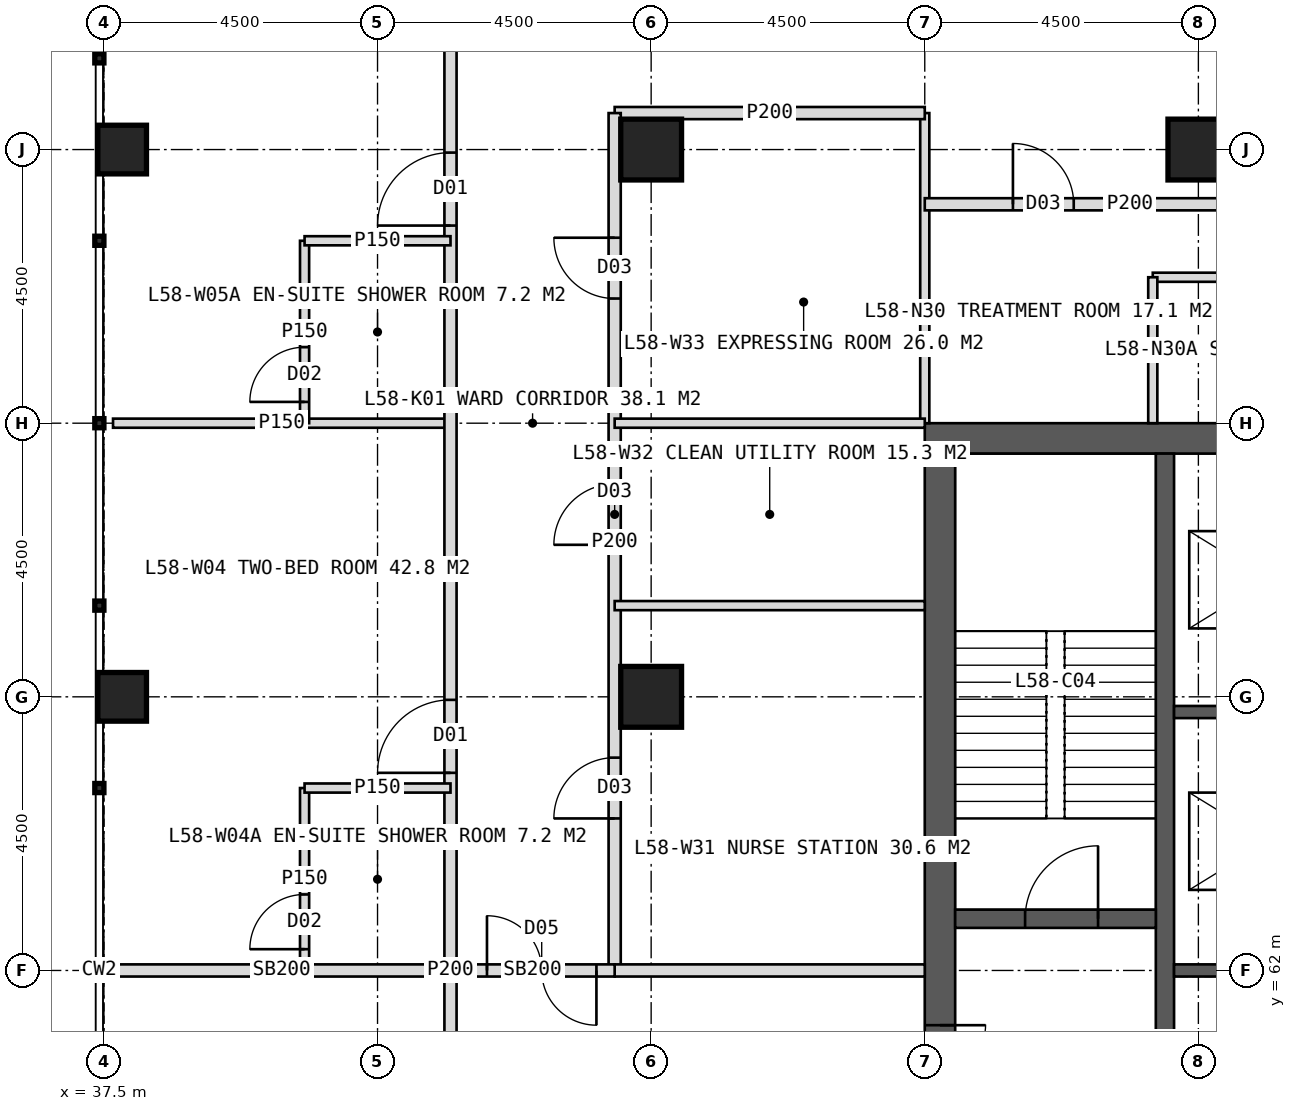
"""IFC4 building model, lengths in metres.
Left out: names, types, materials, properties, quantities, classifications, styles, units other than length and angle.
Written with IfcOpenShell. Run it as: python <this file> out.ifc"""

import sys

from ifc_helpers import new_model, si_unit, direction, frame, frame_2d, origin, origin_2d, place, context, subcontext, project, spatial, rectangle, hollow_rectangle, extrude, element, fill, save


model = new_model("IFC4")
c1 = context("Model", 3, precision=1e-05, world=origin(), true_north=direction((0.0, 1.0)))
c2 = subcontext(c1, "Body", "Model", "MODEL_VIEW")
j1 = project(units=[si_unit("LENGTHUNIT", "METRE"), si_unit("PLANEANGLEUNIT", "RADIAN")], contexts=[c1])
p1 = place(None, origin())
s1 = spatial("IfcSite", under=j1, at=p1, CompositionType="ELEMENT")
p2 = place(p1, origin())
s2 = spatial("IfcBuilding", under=s1, at=p2, CompositionType="ELEMENT")
p3 = place(p2, frame((0.0, 0.0, 241.0)))
s3 = spatial("IfcBuildingStorey", under=s2, at=p3, CompositionType="ELEMENT", Elevation=241.0)
p4 = place(p3, frame((51.0, 70.75, 0.0), z_axis=(0.0, 0.0, 1.0), x_axis=(1.0, 0.0, 0.0)))
e1 = element("IfcWall", 1, at=p4, inside=s3, PredefinedType="SHEAR", context=c2, shape_type="SweptSolid", body=[
    extrude(rectangle(XDim=18.0, YDim=0.5, at=frame_2d((9.0, 0.0))), origin(), (0.0, 0.0, 1.0), 4.0),
])
p5 = place(p4, frame((8.1, 0.0, 0.0)))
e2 = element("IfcOpeningElement", 2, at=p5, cuts=e1, PredefinedType="OPENING", context=c2, shape_type="SweptSolid", body=[
    extrude(rectangle(XDim=1.8, YDim=2.2, at=frame_2d((0.9, 1.1))), frame((0.0, 0.26, 0.0), z_axis=(0.0, -1.0, 0.0), x_axis=(1.0, 0.0, 0.0)), (0.0, 0.0, 1.0), 0.52),
])
p6 = place(p3, frame((51.25, 53.5, 0.0), z_axis=(0.0, 0.0, 1.0), x_axis=(0.0, 1.0, 0.0)))
e3 = element("IfcWall", 3, at=p6, inside=s3, PredefinedType="SHEAR", context=c2, shape_type="SweptSolid", body=[
    extrude(rectangle(XDim=17.0, YDim=0.5, at=frame_2d((8.5, 0.0))), origin(), (0.0, 0.0, 1.0), 4.0),
])
p7 = place(p6, frame((6.1, 0.0, 0.0)))
e4 = element("IfcOpeningElement", 4, at=p7, cuts=e3, PredefinedType="OPENING", context=c2, shape_type="SweptSolid", body=[
    extrude(rectangle(XDim=1.5, YDim=2.2, at=frame_2d((0.75, 1.1))), frame((0.0, 0.26, 0.0), z_axis=(0.0, -1.0, 0.0), x_axis=(1.0, 0.0, 0.0)), (0.0, 0.0, 1.0), 0.52),
])
p8 = place(p3, frame((54.95, 53.5, 0.0), z_axis=(0.0, 0.0, 1.0), x_axis=(0.0, 1.0, 0.0)))
e5 = element("IfcWall", 5, at=p8, inside=s3, PredefinedType="SHEAR", context=c2, shape_type="SweptSolid", body=[
    extrude(rectangle(XDim=17.0, YDim=0.3, at=frame_2d((8.5, 0.0))), origin(), (0.0, 0.0, 1.0), 4.0),
])
for number, where, z_axis, x_axis in (
    (6, (55.1, 62.0, 0.0), (0.0, 0.0, 1.0), (1.0, 0.0, 0.0)),
    (7, (55.1, 66.25, 0.0), (0.0, 0.0, 1.0), (1.0, 0.0, 0.0)),
):
    element("IfcWall", number, at=place(p3, frame(where, z_axis=z_axis, x_axis=x_axis)), inside=s3, PredefinedType="SHEAR", context=c2, shape_type="SweptSolid", body=[
        extrude(rectangle(XDim=3.05, YDim=0.2, at=frame_2d((1.525, 0.0))), origin(), (0.0, 0.0, 1.0), 4.0),
    ])
p9 = place(p3, frame((51.5, 62.85, 0.0), z_axis=(0.0, 0.0, 1.0), x_axis=(1.0, 0.0, 0.0)))
e8 = element("IfcWall", 8, at=p9, inside=s3, PredefinedType="SHEAR", context=c2, shape_type="SweptSolid", body=[
    extrude(rectangle(XDim=3.3, YDim=0.3, at=frame_2d((1.65, 0.0))), origin(), (0.0, 0.0, 1.0), 4.0),
])
p10 = place(p9, frame((1.15, 0.0, 0.0)))
e9 = element("IfcOpeningElement", 9, at=p10, cuts=e8, PredefinedType="OPENING", context=c2, shape_type="SweptSolid", body=[
    extrude(rectangle(XDim=1.2, YDim=2.1, at=frame_2d((0.6, 1.05))), frame((0.0, 0.16, 0.0), z_axis=(0.0, -1.0, 0.0), x_axis=(1.0, 0.0, 0.0)), (0.0, 0.0, 1.0), 0.32),
])
for number, where, z_axis, x_axis in (
    (10, (46.5, 75.5, 0.0), (0.0, 0.0, 1.0), (1.0, 0.0, 0.0)),
    (11, (55.5, 75.5, 0.0), (0.0, 0.0, 1.0), (1.0, 0.0, 0.0)),
    (12, (46.5, 66.5, 0.0), (0.0, 0.0, 1.0), (1.0, 0.0, 0.0)),
):
    element("IfcColumn", number, at=place(p3, frame(where, z_axis=z_axis, x_axis=x_axis)), inside=s3, PredefinedType="COLUMN", context=c2, shape_type="SweptSolid", body=[
        extrude(hollow_rectangle(XDim=1.0, YDim=1.0, WallThickness=0.1, at=origin_2d()), origin(), (0.0, 0.0, 1.0), 4.0),
    ])
for number, where, z_axis, x_axis in (
    (13, (37.8, 66.5, 0.0), (0.0, 0.0, 1.0), (1.0, 0.0, 0.0)),
    (14, (37.8, 75.5, 0.0), (0.0, 0.0, 1.0), (1.0, 0.0, 0.0)),
):
    element("IfcColumn", number, at=place(p3, frame(where, z_axis=z_axis, x_axis=x_axis)), inside=s3, PredefinedType="COLUMN", context=c2, shape_type="SweptSolid", body=[
        extrude(hollow_rectangle(XDim=0.8, YDim=0.8, WallThickness=0.08, at=origin_2d()), origin(), (0.0, 0.0, 1.0), 4.0),
    ])
p11 = place(p3, frame((51.0, 71.0, 0.0), z_axis=(0.0, 0.0, 1.0), x_axis=(0.0, 1.0, 0.0)))
e15 = element("IfcWall", 15, at=p11, inside=s3, PredefinedType="PARTITIONING", context=c2, shape_type="SweptSolid", body=[
    extrude(rectangle(XDim=5.1, YDim=0.15, at=frame_2d((2.55, 0.0))), origin(), (0.0, 0.0, 1.0), 3.75),
])
p12 = place(p3, frame((45.9, 76.1, 0.0), z_axis=(0.0, 0.0, 1.0), x_axis=(1.0, 0.0, 0.0)))
e16 = element("IfcWall", 16, at=p12, inside=s3, PredefinedType="PARTITIONING", context=c2, shape_type="SweptSolid", body=[
    extrude(rectangle(XDim=5.1, YDim=0.2, at=frame_2d((2.55, 0.0))), origin(), (0.0, 0.0, 1.0), 3.75),
])
p13 = place(p3, frame((51.0, 74.6, 0.0), z_axis=(0.0, 0.0, 1.0), x_axis=(1.0, 0.0, 0.0)))
e17 = element("IfcWall", 17, at=p13, inside=s3, PredefinedType="PARTITIONING", context=c2, shape_type="SweptSolid", body=[
    extrude(rectangle(XDim=6.75, YDim=0.2, at=frame_2d((3.375, 0.0))), origin(), (0.0, 0.0, 1.0), 3.75),
])
p14 = place(p13, frame((1.45, 0.0, 0.0)))
e18 = element("IfcOpeningElement", 18, at=p14, cuts=e17, PredefinedType="OPENING", context=c2, shape_type="SweptSolid", body=[
    extrude(rectangle(XDim=1.0, YDim=2.1, at=frame_2d((0.5, 1.05))), frame((0.0, 0.11, 0.0), z_axis=(0.0, -1.0, 0.0), x_axis=(1.0, 0.0, 0.0)), (0.0, 0.0, 1.0), 0.22),
])
p15 = place(p3, frame((54.75, 73.4, 0.0), z_axis=(0.0, 0.0, 1.0), x_axis=(1.0, 0.0, 0.0)))
e19 = element("IfcWall", 19, at=p15, inside=s3, PredefinedType="PARTITIONING", context=c2, shape_type="SweptSolid", body=[
    extrude(rectangle(XDim=3.0, YDim=0.15, at=frame_2d((1.5, 0.0))), origin(), (0.0, 0.0, 1.0), 3.75),
])
p16 = place(p3, frame((54.75, 71.0, 0.0), z_axis=(0.0, 0.0, 1.0), x_axis=(0.0, 1.0, 0.0)))
e20 = element("IfcWall", 20, at=p16, inside=s3, PredefinedType="PARTITIONING", context=c2, shape_type="SweptSolid", body=[
    extrude(rectangle(XDim=2.4, YDim=0.15, at=frame_2d((1.2, 0.0))), origin(), (0.0, 0.0, 1.0), 3.75),
])
p17 = place(p3, frame((43.2, 62.0, 0.0), z_axis=(0.0, 0.0, 1.0), x_axis=(-1.0, 0.0, 0.0)))
e21 = element("IfcWall", 21, at=p17, inside=s3, PredefinedType="SOLIDWALL", context=c2, shape_type="SweptSolid", body=[
    extrude(rectangle(XDim=5.55, YDim=0.2, at=frame_2d((2.775, 0.0))), origin(), (0.0, 0.0, 1.0), 2.95),
])
p18 = place(p3, frame((43.2, 71.0, 0.0), z_axis=(0.0, 0.0, 1.0), x_axis=(-1.0, 0.0, 0.0)))
e22 = element("IfcWall", 22, at=p18, inside=s3, PredefinedType="PARTITIONING", context=c2, shape_type="SweptSolid", body=[
    extrude(rectangle(XDim=5.55, YDim=0.15, at=frame_2d((2.775, 0.0))), origin(), (0.0, 0.0, 1.0), 3.75),
])
p19 = place(p3, frame((43.2, 45.2, 0.0), z_axis=(0.0, 0.0, 1.0), x_axis=(0.0, 1.0, 0.0)))
e23 = element("IfcWall", 23, at=p19, inside=s3, PredefinedType="PARTITIONING", context=c2, shape_type="SweptSolid", body=[
    extrude(rectangle(XDim=33.6, YDim=0.2, at=frame_2d((16.8, 0.0))), origin(), (0.0, 0.0, 1.0), 3.75),
])
p20 = place(p19, frame((2.65, 0.0, 0.0)))
e24 = element("IfcOpeningElement", 24, at=p20, cuts=e23, PredefinedType="OPENING", context=c2, shape_type="SweptSolid", body=[
    extrude(rectangle(XDim=1.2, YDim=2.2, at=frame_2d((0.6, 1.1))), frame((0.0, 0.11, 0.0), z_axis=(0.0, -1.0, 0.0), x_axis=(1.0, 0.0, 0.0)), (0.0, 0.0, 1.0), 0.22),
])
p21 = place(p19, frame((7.45, 0.0, 0.0)))
e25 = element("IfcOpeningElement", 25, at=p21, cuts=e23, PredefinedType="OPENING", context=c2, shape_type="SweptSolid", body=[
    extrude(rectangle(XDim=1.2, YDim=2.2, at=frame_2d((0.6, 1.1))), frame((0.0, 0.11, 0.0), z_axis=(0.0, -1.0, 0.0), x_axis=(1.0, 0.0, 0.0)), (0.0, 0.0, 1.0), 0.22),
])
p22 = place(p19, frame((13.45, 0.0, 0.0)))
e26 = element("IfcOpeningElement", 26, at=p22, cuts=e23, PredefinedType="OPENING", context=c2, shape_type="SweptSolid", body=[
    extrude(rectangle(XDim=1.2, YDim=2.2, at=frame_2d((0.6, 1.1))), frame((0.0, 0.11, 0.0), z_axis=(0.0, -1.0, 0.0), x_axis=(1.0, 0.0, 0.0)), (0.0, 0.0, 1.0), 0.22),
])
p23 = place(p19, frame((20.05, 0.0, 0.0)))
e27 = element("IfcOpeningElement", 27, at=p23, cuts=e23, PredefinedType="OPENING", context=c2, shape_type="SweptSolid", body=[
    extrude(rectangle(XDim=1.2, YDim=2.2, at=frame_2d((0.6, 1.1))), frame((0.0, 0.11, 0.0), z_axis=(0.0, -1.0, 0.0), x_axis=(1.0, 0.0, 0.0)), (0.0, 0.0, 1.0), 0.22),
])
p24 = place(p19, frame((29.05, 0.0, 0.0)))
e28 = element("IfcOpeningElement", 28, at=p24, cuts=e23, PredefinedType="OPENING", context=c2, shape_type="SweptSolid", body=[
    extrude(rectangle(XDim=1.2, YDim=2.2, at=frame_2d((0.6, 1.1))), frame((0.0, 0.11, 0.0), z_axis=(0.0, -1.0, 0.0), x_axis=(1.0, 0.0, 0.0)), (0.0, 0.0, 1.0), 0.22),
])
p25 = place(p3, frame((40.8, 62.0, 0.0), z_axis=(0.0, 0.0, 1.0), x_axis=(0.0, 1.0, 0.0)))
e29 = element("IfcWall", 29, at=p25, inside=s3, PredefinedType="PARTITIONING", context=c2, shape_type="SweptSolid", body=[
    extrude(rectangle(XDim=3.0, YDim=0.15, at=frame_2d((1.5, 0.0))), origin(), (0.0, 0.0, 1.0), 3.75),
])
p26 = place(p25, frame((0.35, 0.0, 0.0)))
e30 = element("IfcOpeningElement", 30, at=p26, cuts=e29, PredefinedType="OPENING", context=c2, shape_type="SweptSolid", body=[
    extrude(rectangle(XDim=0.9, YDim=2.1, at=frame_2d((0.45, 1.05))), frame((0.0, 0.085, 0.0), z_axis=(0.0, -1.0, 0.0), x_axis=(1.0, 0.0, 0.0)), (0.0, 0.0, 1.0), 0.17),
])
p27 = place(p3, frame((43.2, 65.0, 0.0), z_axis=(0.0, 0.0, 1.0), x_axis=(-1.0, 0.0, 0.0)))
e31 = element("IfcWall", 31, at=p27, inside=s3, PredefinedType="PARTITIONING", context=c2, shape_type="SweptSolid", body=[
    extrude(rectangle(XDim=2.4, YDim=0.15, at=frame_2d((1.2, 0.0))), origin(), (0.0, 0.0, 1.0), 3.75),
])
p28 = place(p3, frame((40.8, 71.0, 0.0), z_axis=(0.0, 0.0, 1.0), x_axis=(0.0, 1.0, 0.0)))
e32 = element("IfcWall", 32, at=p28, inside=s3, PredefinedType="PARTITIONING", context=c2, shape_type="SweptSolid", body=[
    extrude(rectangle(XDim=3.0, YDim=0.15, at=frame_2d((1.5, 0.0))), origin(), (0.0, 0.0, 1.0), 3.75),
])
p29 = place(p28, frame((0.35, 0.0, 0.0)))
e33 = element("IfcOpeningElement", 33, at=p29, cuts=e32, PredefinedType="OPENING", context=c2, shape_type="SweptSolid", body=[
    extrude(rectangle(XDim=0.9, YDim=2.1, at=frame_2d((0.45, 1.05))), frame((0.0, 0.085, 0.0), z_axis=(0.0, -1.0, 0.0), x_axis=(1.0, 0.0, 0.0)), (0.0, 0.0, 1.0), 0.17),
])
p30 = place(p3, frame((43.2, 74.0, 0.0), z_axis=(0.0, 0.0, 1.0), x_axis=(-1.0, 0.0, 0.0)))
e34 = element("IfcWall", 34, at=p30, inside=s3, PredefinedType="PARTITIONING", context=c2, shape_type="SweptSolid", body=[
    extrude(rectangle(XDim=2.4, YDim=0.15, at=frame_2d((1.2, 0.0))), origin(), (0.0, 0.0, 1.0), 3.75),
])
p31 = place(p3, frame((45.9, 62.0, 0.0), z_axis=(0.0, 0.0, 1.0), x_axis=(0.0, 1.0, 0.0)))
e35 = element("IfcWall", 35, at=p31, inside=s3, PredefinedType="PARTITIONING", context=c2, shape_type="SweptSolid", body=[
    extrude(rectangle(XDim=14.1, YDim=0.2, at=frame_2d((7.05, 0.0))), origin(), (0.0, 0.0, 1.0), 3.75),
])
p32 = place(p31, frame((2.5, 0.0, 0.0)))
e36 = element("IfcOpeningElement", 36, at=p32, cuts=e35, PredefinedType="OPENING", context=c2, shape_type="SweptSolid", body=[
    extrude(rectangle(XDim=1.0, YDim=2.1, at=frame_2d((0.5, 1.05))), frame((0.0, 0.11, 0.0), z_axis=(0.0, -1.0, 0.0), x_axis=(1.0, 0.0, 0.0)), (0.0, 0.0, 1.0), 0.22),
])
p33 = place(p31, frame((7.0, 0.0, 0.0)))
e37 = element("IfcOpeningElement", 37, at=p33, cuts=e35, PredefinedType="OPENING", context=c2, shape_type="SweptSolid", body=[
    extrude(rectangle(XDim=1.0, YDim=2.1, at=frame_2d((0.5, 1.05))), frame((0.0, 0.11, 0.0), z_axis=(0.0, -1.0, 0.0), x_axis=(1.0, 0.0, 0.0)), (0.0, 0.0, 1.0), 0.22),
])
p34 = place(p31, frame((11.05, 0.0, 0.0)))
e38 = element("IfcOpeningElement", 38, at=p34, cuts=e35, PredefinedType="OPENING", context=c2, shape_type="SweptSolid", body=[
    extrude(rectangle(XDim=1.0, YDim=2.1, at=frame_2d((0.5, 1.05))), frame((0.0, 0.11, 0.0), z_axis=(0.0, -1.0, 0.0), x_axis=(1.0, 0.0, 0.0)), (0.0, 0.0, 1.0), 0.22),
])
p35 = place(p3, frame((51.0, 62.0, 0.0), z_axis=(0.0, 0.0, 1.0), x_axis=(-1.0, 0.0, 0.0)))
e39 = element("IfcWall", 39, at=p35, inside=s3, PredefinedType="SOLIDWALL", context=c2, shape_type="SweptSolid", body=[
    extrude(rectangle(XDim=5.1, YDim=0.2, at=frame_2d((2.55, 0.0))), origin(), (0.0, 0.0, 1.0), 2.95),
])
for number, where, z_axis, x_axis in (
    (40, (51.0, 68.0, 0.0), (0.0, 0.0, 1.0), (-1.0, 0.0, 0.0)),
    (41, (51.0, 71.0, 0.0), (0.0, 0.0, 1.0), (-1.0, 0.0, 0.0)),
):
    element("IfcWall", number, at=place(p3, frame(where, z_axis=z_axis, x_axis=x_axis)), inside=s3, PredefinedType="PARTITIONING", context=c2, shape_type="SweptSolid", body=[
        extrude(rectangle(XDim=5.1, YDim=0.15, at=frame_2d((2.55, 0.0))), origin(), (0.0, 0.0, 1.0), 3.75),
    ])
p36 = place(p3, frame((45.9, 62.0, 0.0), z_axis=(0.0, 0.0, 1.0), x_axis=(-1.0, 0.0, 0.0)))
e42 = element("IfcWall", 42, at=p36, inside=s3, PredefinedType="SOLIDWALL", context=c2, shape_type="SweptSolid", body=[
    extrude(rectangle(XDim=2.7, YDim=0.2, at=frame_2d((1.35, 0.0))), origin(), (0.0, 0.0, 1.0), 2.95),
])
p37 = place(p36, frame((0.3, 0.0, 0.0)))
e43 = element("IfcOpeningElement", 43, at=p37, cuts=e42, PredefinedType="OPENING", context=c2, shape_type="SweptSolid", body=[
    extrude(rectangle(XDim=1.8, YDim=2.2, at=frame_2d((0.9, 1.1))), frame((0.0, 0.11, 0.0), z_axis=(0.0, -1.0, 0.0), x_axis=(1.0, 0.0, 0.0)), (0.0, 0.0, 1.0), 0.22),
])
p38 = place(p14, origin())
e44 = element("IfcDoor", 44, at=p38, inside=s3, OperationType="SINGLE_SWING_LEFT", PredefinedType="DOOR", context=c2, shape_type="SweptSolid", body=[
    extrude(rectangle(XDim=1.0, YDim=2.1, at=frame_2d((0.5, 1.05))), frame((0.0, 0.025, 0.0), z_axis=(0.0, -1.0, 0.0), x_axis=(1.0, 0.0, 0.0)), (0.0, 0.0, 1.0), 0.05),
])
fill(e18, e44)
p39 = place(p23, origin())
e45 = element("IfcDoor", 45, at=p39, inside=s3, OperationType="SINGLE_SWING_LEFT", PredefinedType="DOOR", context=c2, shape_type="SweptSolid", body=[
    extrude(rectangle(XDim=1.2, YDim=2.2, at=frame_2d((0.6, 1.1))), frame((0.0, 0.025, 0.0), z_axis=(0.0, -1.0, 0.0), x_axis=(1.0, 0.0, 0.0)), (0.0, 0.0, 1.0), 0.05),
])
fill(e27, e45)
p40 = place(p26, origin())
e46 = element("IfcDoor", 46, at=p40, inside=s3, OperationType="SINGLE_SWING_LEFT", PredefinedType="DOOR", context=c2, shape_type="SweptSolid", body=[
    extrude(rectangle(XDim=0.9, YDim=2.1, at=frame_2d((0.45, 1.05))), frame((0.0, 0.025, 0.0), z_axis=(0.0, -1.0, 0.0), x_axis=(1.0, 0.0, 0.0)), (0.0, 0.0, 1.0), 0.05),
])
fill(e30, e46)
p41 = place(p24, origin())
e47 = element("IfcDoor", 47, at=p41, inside=s3, OperationType="SINGLE_SWING_LEFT", PredefinedType="DOOR", context=c2, shape_type="SweptSolid", body=[
    extrude(rectangle(XDim=1.2, YDim=2.2, at=frame_2d((0.6, 1.1))), frame((0.0, 0.025, 0.0), z_axis=(0.0, -1.0, 0.0), x_axis=(1.0, 0.0, 0.0)), (0.0, 0.0, 1.0), 0.05),
])
fill(e28, e47)
p42 = place(p29, origin())
e48 = element("IfcDoor", 48, at=p42, inside=s3, OperationType="SINGLE_SWING_LEFT", PredefinedType="DOOR", context=c2, shape_type="SweptSolid", body=[
    extrude(rectangle(XDim=0.9, YDim=2.1, at=frame_2d((0.45, 1.05))), frame((0.0, 0.025, 0.0), z_axis=(0.0, -1.0, 0.0), x_axis=(1.0, 0.0, 0.0)), (0.0, 0.0, 1.0), 0.05),
])
fill(e33, e48)
p43 = place(p32, origin())
e49 = element("IfcDoor", 49, at=p43, inside=s3, OperationType="SINGLE_SWING_LEFT", PredefinedType="DOOR", context=c2, shape_type="SweptSolid", body=[
    extrude(rectangle(XDim=1.0, YDim=2.1, at=frame_2d((0.5, 1.05))), frame((0.0, 0.025, 0.0), z_axis=(0.0, -1.0, 0.0), x_axis=(1.0, 0.0, 0.0)), (0.0, 0.0, 1.0), 0.05),
])
fill(e36, e49)
p44 = place(p33, origin())
e50 = element("IfcDoor", 50, at=p44, inside=s3, OperationType="SINGLE_SWING_LEFT", PredefinedType="DOOR", context=c2, shape_type="SweptSolid", body=[
    extrude(rectangle(XDim=1.0, YDim=2.1, at=frame_2d((0.5, 1.05))), frame((0.0, 0.025, 0.0), z_axis=(0.0, -1.0, 0.0), x_axis=(1.0, 0.0, 0.0)), (0.0, 0.0, 1.0), 0.05),
])
fill(e37, e50)
p45 = place(p34, origin())
e51 = element("IfcDoor", 51, at=p45, inside=s3, OperationType="SINGLE_SWING_RIGHT", PredefinedType="DOOR", context=c2, shape_type="SweptSolid", body=[
    extrude(rectangle(XDim=1.0, YDim=2.1, at=frame_2d((0.5, 1.05))), frame((0.0, 0.025, 0.0), z_axis=(0.0, -1.0, 0.0), x_axis=(1.0, 0.0, 0.0)), (0.0, 0.0, 1.0), 0.05),
])
fill(e38, e51)
p46 = place(p37, origin())
e52 = element("IfcDoor", 52, at=p46, inside=s3, OperationType="DOUBLE_DOOR_DOUBLE_SWING", PredefinedType="DOOR", context=c2, shape_type="SweptSolid", body=[
    extrude(rectangle(XDim=1.8, YDim=2.2, at=frame_2d((0.9, 1.1))), frame((0.0, 0.025, 0.0), z_axis=(0.0, -1.0, 0.0), x_axis=(1.0, 0.0, 0.0)), (0.0, 0.0, 1.0), 0.05),
])
fill(e43, e52)
p47 = place(p7, origin())
e53 = element("IfcDoor", 53, at=p47, inside=s3, OperationType="DOUBLE_DOOR_SINGLE_SWING", PredefinedType="DOOR", context=c2, shape_type="SweptSolid", body=[
    extrude(rectangle(XDim=1.5, YDim=2.2, at=frame_2d((0.75, 1.1))), frame((0.0, 0.025, 0.0), z_axis=(0.0, -1.0, 0.0), x_axis=(1.0, 0.0, 0.0)), (0.0, 0.0, 1.0), 0.05),
])
fill(e4, e53)
p48 = place(p10, origin())
e54 = element("IfcDoor", 54, at=p48, inside=s3, OperationType="SINGLE_SWING_RIGHT", PredefinedType="DOOR", context=c2, shape_type="SweptSolid", body=[
    extrude(rectangle(XDim=1.2, YDim=2.1, at=frame_2d((0.6, 1.05))), frame((0.0, 0.025, 0.0), z_axis=(0.0, -1.0, 0.0), x_axis=(1.0, 0.0, 0.0)), (0.0, 0.0, 1.0), 0.05),
])
fill(e9, e54)
save(model, sys.argv[1])
